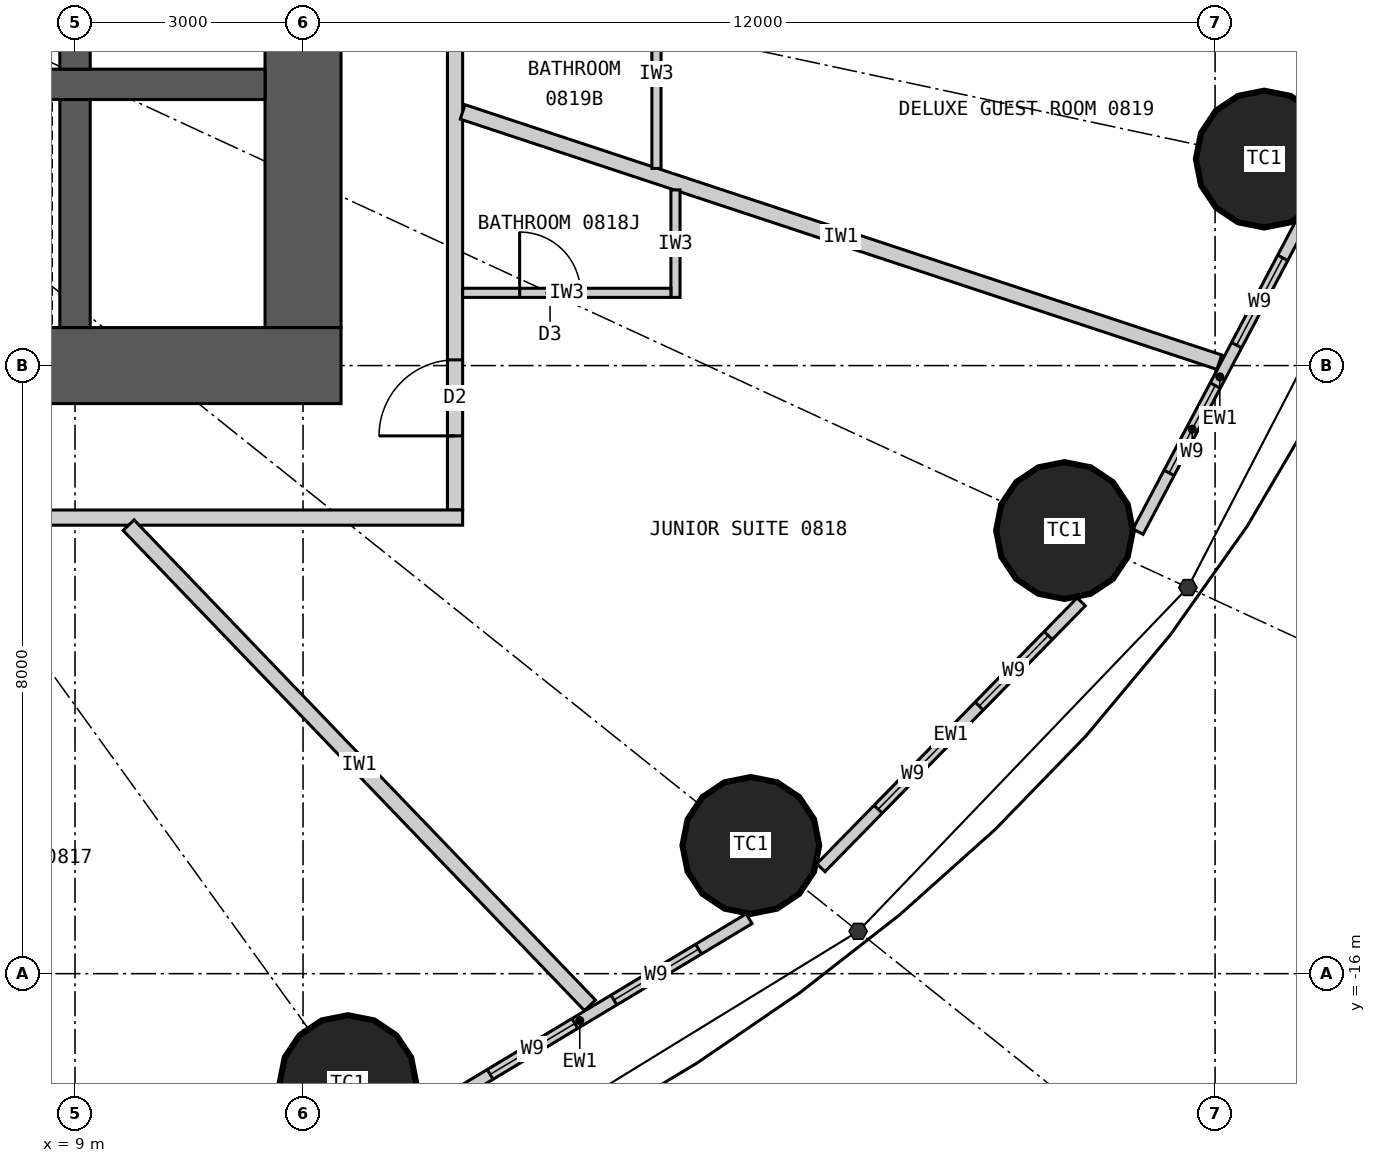
"""IFC4 building model, lengths in metres.
Left out: names, types, materials, properties, quantities, classifications, styles, units other than length and angle.
Written with IfcOpenShell. Run it as: python <this file> out.ifc"""

import sys

from ifc_helpers import new_model, si_unit, direction, frame, frame_2d, origin, origin_2d, place, context, subcontext, project, spatial, rectangle, circle, extrude, element, fill, save


model = new_model("IFC4")
c1 = context("Model", 3, precision=1e-05, world=origin(), true_north=direction((0.0, 1.0)))
c2 = subcontext(c1, "Body", "Model", "MODEL_VIEW")
j1 = project(units=[si_unit("LENGTHUNIT", "METRE"), si_unit("PLANEANGLEUNIT", "RADIAN")], contexts=[c1])
p1 = place(None, origin())
s1 = spatial("IfcSite", under=j1, at=p1, CompositionType="ELEMENT")
p2 = place(p1, origin())
s2 = spatial("IfcBuilding", under=s1, at=p2, CompositionType="ELEMENT")
p3 = place(p2, frame((0.0, 0.0, 39.3)))
s3 = spatial("IfcBuildingStorey", under=s2, at=p3, CompositionType="ELEMENT", Elevation=39.3)
for number, where, z_axis, x_axis in (
    (1, (12.591, -17.447, 0.0), (0.0, 0.0, 1.0), (1.0, 0.0, 0.0)),
    (2, (17.892, -14.313, 0.0), (0.0, 0.0, 1.0), (1.0, 0.0, 0.0)),
    (3, (22.019, -10.17, 0.0), (0.0, 0.0, 1.0), (1.0, 0.0, 0.0)),
    (4, (24.647, -5.283, 0.0), (0.0, 0.0, 1.0), (1.0, 0.0, 0.0)),
):
    element("IfcColumn", number, at=place(p3, frame(where, z_axis=z_axis, x_axis=x_axis)), inside=s3, PredefinedType="COLUMN", context=c2, shape_type="SweptSolid", body=[
        extrude(circle(Radius=0.9, at=origin_2d()), origin(), (0.0, 0.0, 1.0), 3.3),
    ])
p4 = place(p3, frame((12.5, -8.0, 0.0), z_axis=(0.0, 0.0, 1.0), x_axis=(-1.0, 0.0, 0.0)))
e5 = element("IfcWall", 5, at=p4, inside=s3, PredefinedType="SHEAR", context=c2, shape_type="SweptSolid", body=[
    extrude(rectangle(XDim=25.0, YDim=1.0, at=frame_2d((12.5, 0.0))), origin(), (0.0, 0.0, 1.0), 3.3),
])
p5 = place(p4, frame((11.2, 0.0, 0.0)))
e6 = element("IfcOpeningElement", 6, at=p5, cuts=e5, PredefinedType="OPENING", context=c2, shape_type="SweptSolid", body=[
    extrude(rectangle(XDim=1.2, YDim=2.2, at=frame_2d((0.6, 1.1))), frame((0.0, 0.51, 0.0), z_axis=(0.0, -1.0, 0.0), x_axis=(1.0, 0.0, 0.0)), (0.0, 0.0, 1.0), 1.02),
])
p6 = place(p4, frame((18.8, 0.0, 0.0)))
e7 = element("IfcOpeningElement", 7, at=p6, cuts=e5, PredefinedType="OPENING", context=c2, shape_type="SweptSolid", body=[
    extrude(rectangle(XDim=0.9, YDim=2.2, at=frame_2d((0.45, 1.1))), frame((0.0, 0.51, 0.0), z_axis=(0.0, -1.0, 0.0), x_axis=(1.0, 0.0, 0.0)), (0.0, 0.0, 1.0), 1.02),
])
p7 = place(p3, frame((12.0, -7.5, 0.0), z_axis=(0.0, 0.0, 1.0), x_axis=(0.0, 1.0, 0.0)))
e8 = element("IfcWall", 8, at=p7, inside=s3, PredefinedType="SHEAR", context=c2, shape_type="SweptSolid", body=[
    extrude(rectangle(XDim=15.0, YDim=1.0, at=frame_2d((7.5, 0.0))), origin(), (0.0, 0.0, 1.0), 3.3),
])
p8 = place(p7, frame((6.6, 0.0, 0.0)))
e9 = element("IfcOpeningElement", 9, at=p8, cuts=e8, PredefinedType="OPENING", context=c2, shape_type="SweptSolid", body=[
    extrude(rectangle(XDim=1.8, YDim=2.2, at=frame_2d((0.9, 1.1))), frame((0.0, 0.51, 0.0), z_axis=(0.0, -1.0, 0.0), x_axis=(1.0, 0.0, 0.0)), (0.0, 0.0, 1.0), 1.02),
])
p9 = place(p3, frame((-11.5, -4.3, 0.0), z_axis=(0.0, 0.0, 1.0), x_axis=(1.0, 0.0, 0.0)))
e10 = element("IfcWall", 10, at=p9, inside=s3, PredefinedType="SHEAR", context=c2, shape_type="SweptSolid", body=[
    extrude(rectangle(XDim=23.0, YDim=0.4, at=frame_2d((11.5, 0.0))), origin(), (0.0, 0.0, 1.0), 3.3),
])
p10 = place(p3, frame((9.0, -4.1, 0.0), z_axis=(0.0, 0.0, 1.0), x_axis=(0.0, 1.0, 0.0)))
e11 = element("IfcWall", 11, at=p10, inside=s3, PredefinedType="SHEAR", context=c2, shape_type="SweptSolid", body=[
    extrude(rectangle(XDim=2.35, YDim=0.4, at=frame_2d((1.175, 0.0))), origin(), (0.0, 0.0, 1.0), 3.3),
])
p11 = place(p3, frame((9.0, -7.5, 0.0), z_axis=(0.0, 0.0, 1.0), x_axis=(0.0, 1.0, 0.0)))
e12 = element("IfcWall", 12, at=p11, inside=s3, PredefinedType="SHEAR", context=c2, shape_type="SweptSolid", body=[
    extrude(rectangle(XDim=3.0, YDim=0.4, at=frame_2d((1.5, 0.0))), origin(), (0.0, 0.0, 1.0), 3.3),
])
p12 = place(p3, frame((13.412, -17.957, 0.0), z_axis=(0.0, 0.0, 1.0), x_axis=(0.856958191554, 0.515385931054, 0.0)))
e13 = element("IfcWall", 13, at=p12, inside=s3, PredefinedType="ELEMENTEDWALL", context=c2, shape_type="SweptSolid", body=[
    extrude(rectangle(XDim=5.201, YDim=0.15, at=frame_2d((2.601, 0.0))), origin(), (0.0, 0.0, 1.0), 3.12),
])
p13 = place(p12, frame((1.225, 0.0, 0.9)))
e14 = element("IfcOpeningElement", 14, at=p13, cuts=e13, PredefinedType="OPENING", context=c2, shape_type="SweptSolid", body=[
    extrude(rectangle(XDim=1.3, YDim=1.9, at=frame_2d((0.65, 0.95))), frame((0.0, 0.085, 0.0), z_axis=(0.0, -1.0, 0.0), x_axis=(1.0, 0.0, 0.0)), (0.0, 0.0, 1.0), 0.17),
])
p14 = place(p12, frame((3.125, 0.0, 0.9)))
e15 = element("IfcOpeningElement", 15, at=p14, cuts=e13, PredefinedType="OPENING", context=c2, shape_type="SweptSolid", body=[
    extrude(rectangle(XDim=1.3, YDim=1.9, at=frame_2d((0.65, 0.95))), frame((0.0, 0.085, 0.0), z_axis=(0.0, -1.0, 0.0), x_axis=(1.0, 0.0, 0.0)), (0.0, 0.0, 1.0), 0.17),
])
p15 = place(p3, frame((18.813, -14.607, 0.0), z_axis=(0.0, 0.0, 1.0), x_axis=(0.699612594083, 0.714522370679, 0.0)))
e16 = element("IfcWall", 16, at=p15, inside=s3, PredefinedType="ELEMENTEDWALL", context=c2, shape_type="SweptSolid", body=[
    extrude(rectangle(XDim=4.896, YDim=0.15, at=frame_2d((2.448, 0.0))), origin(), (0.0, 0.0, 1.0), 3.12),
])
p16 = place(p15, frame((1.077, 0.0, 0.9)))
e17 = element("IfcOpeningElement", 17, at=p16, cuts=e16, PredefinedType="OPENING", context=c2, shape_type="SweptSolid", body=[
    extrude(rectangle(XDim=1.3, YDim=1.9, at=frame_2d((0.65, 0.95))), frame((0.0, 0.085, 0.0), z_axis=(0.0, -1.0, 0.0), x_axis=(1.0, 0.0, 0.0)), (0.0, 0.0, 1.0), 0.17),
])
p17 = place(p15, frame((2.977, 0.0, 0.9)))
e18 = element("IfcOpeningElement", 18, at=p17, cuts=e16, PredefinedType="OPENING", context=c2, shape_type="SweptSolid", body=[
    extrude(rectangle(XDim=1.3, YDim=1.9, at=frame_2d((0.65, 0.95))), frame((0.0, 0.085, 0.0), z_axis=(0.0, -1.0, 0.0), x_axis=(1.0, 0.0, 0.0)), (0.0, 0.0, 1.0), 0.17),
])
p18 = place(p3, frame((22.986, -10.185, 0.0), z_axis=(0.0, 0.0, 1.0), x_axis=(0.467303182954, 0.884097129959, 0.0)))
e19 = element("IfcWall", 19, at=p18, inside=s3, PredefinedType="ELEMENTEDWALL", context=c2, shape_type="SweptSolid", body=[
    extrude(rectangle(XDim=4.606, YDim=0.15, at=frame_2d((2.303, 0.0))), origin(), (0.0, 0.0, 1.0), 3.12),
])
p19 = place(p18, frame((0.875, 0.0, 0.9)))
e20 = element("IfcOpeningElement", 20, at=p19, cuts=e19, PredefinedType="OPENING", context=c2, shape_type="SweptSolid", body=[
    extrude(rectangle(XDim=1.3, YDim=1.9, at=frame_2d((0.65, 0.95))), frame((0.0, 0.085, 0.0), z_axis=(0.0, -1.0, 0.0), x_axis=(1.0, 0.0, 0.0)), (0.0, 0.0, 1.0), 0.17),
])
p20 = place(p18, frame((2.775, 0.0, 0.9)))
e21 = element("IfcOpeningElement", 21, at=p20, cuts=e19, PredefinedType="OPENING", context=c2, shape_type="SweptSolid", body=[
    extrude(rectangle(XDim=1.3, YDim=1.9, at=frame_2d((0.65, 0.95))), frame((0.0, 0.085, 0.0), z_axis=(0.0, -1.0, 0.0), x_axis=(1.0, 0.0, 0.0)), (0.0, 0.0, 1.0), 0.17),
])
p21 = place(p3, frame((14.0, -9.9, 0.0), z_axis=(0.0, 0.0, 1.0), x_axis=(0.0, 1.0, 0.0)))
e22 = element("IfcWall", 22, at=p21, inside=s3, PredefinedType="PARTITIONING", context=c2, shape_type="SweptSolid", body=[
    extrude(rectangle(XDim=19.8, YDim=0.2, at=frame_2d((9.9, 0.0))), origin(), (0.0, 0.0, 1.0), 3.12),
])
p22 = place(p21, frame((11.698, 0.0, 0.0)))
e23 = element("IfcOpeningElement", 23, at=p22, cuts=e22, PredefinedType="OPENING", context=c2, shape_type="SweptSolid", body=[
    extrude(rectangle(XDim=1.0, YDim=2.2, at=frame_2d((0.5, 1.1))), frame((0.0, 0.11, 0.0), z_axis=(0.0, -1.0, 0.0), x_axis=(1.0, 0.0, 0.0)), (0.0, 0.0, 1.0), 0.22),
])
p23 = place(p21, frame((13.554, 0.0, 0.0)))
e24 = element("IfcOpeningElement", 24, at=p23, cuts=e22, PredefinedType="OPENING", context=c2, shape_type="SweptSolid", body=[
    extrude(rectangle(XDim=1.0, YDim=2.0, at=frame_2d((0.5, 1.0))), frame((0.0, 0.11, 0.0), z_axis=(0.0, -1.0, 0.0), x_axis=(1.0, 0.0, 0.0)), (0.0, 0.0, 1.0), 0.22),
])
p24 = place(p21, frame((18.698, 0.0, 0.0)))
e25 = element("IfcOpeningElement", 25, at=p24, cuts=e22, PredefinedType="OPENING", context=c2, shape_type="SweptSolid", body=[
    extrude(rectangle(XDim=1.0, YDim=2.2, at=frame_2d((0.5, 1.1))), frame((0.0, 0.11, 0.0), z_axis=(0.0, -1.0, 0.0), x_axis=(1.0, 0.0, 0.0)), (0.0, 0.0, 1.0), 0.22),
])
p25 = place(p21, frame((0.975, 0.0, 0.0)))
e26 = element("IfcOpeningElement", 26, at=p25, cuts=e22, PredefinedType="OPENING", context=c2, shape_type="SweptSolid", body=[
    extrude(rectangle(XDim=1.0, YDim=2.2, at=frame_2d((0.5, 1.1))), frame((0.0, 0.11, 0.0), z_axis=(0.0, -1.0, 0.0), x_axis=(1.0, 0.0, 0.0)), (0.0, 0.0, 1.0), 0.22),
])
p26 = place(p21, frame((7.097, 0.0, 0.0)))
e27 = element("IfcOpeningElement", 27, at=p26, cuts=e22, PredefinedType="OPENING", context=c2, shape_type="SweptSolid", body=[
    extrude(rectangle(XDim=1.0, YDim=2.2, at=frame_2d((0.5, 1.1))), frame((0.0, 0.11, 0.0), z_axis=(0.0, -1.0, 0.0), x_axis=(1.0, 0.0, 0.0)), (0.0, 0.0, 1.0), 0.22),
])
p27 = place(p3, frame((14.1, -10.0, 0.0), z_axis=(0.0, 0.0, 1.0), x_axis=(-1.0, 0.0, 0.0)))
e28 = element("IfcWall", 28, at=p27, inside=s3, PredefinedType="PARTITIONING", context=c2, shape_type="SweptSolid", body=[
    extrude(rectangle(XDim=28.2, YDim=0.2, at=frame_2d((14.1, 0.0))), origin(), (0.0, 0.0, 1.0), 3.12),
])
p28 = place(p27, frame((21.948, 0.0, 0.0)))
e29 = element("IfcOpeningElement", 29, at=p28, cuts=e28, PredefinedType="OPENING", context=c2, shape_type="SweptSolid", body=[
    extrude(rectangle(XDim=1.0, YDim=2.2, at=frame_2d((0.5, 1.1))), frame((0.0, 0.11, 0.0), z_axis=(0.0, -1.0, 0.0), x_axis=(1.0, 0.0, 0.0)), (0.0, 0.0, 1.0), 0.22),
])
p29 = place(p27, frame((15.684, 0.0, 0.0)))
e30 = element("IfcOpeningElement", 30, at=p29, cuts=e28, PredefinedType="OPENING", context=c2, shape_type="SweptSolid", body=[
    extrude(rectangle(XDim=1.0, YDim=2.2, at=frame_2d((0.5, 1.1))), frame((0.0, 0.11, 0.0), z_axis=(0.0, -1.0, 0.0), x_axis=(1.0, 0.0, 0.0)), (0.0, 0.0, 1.0), 0.22),
])
p30 = place(p27, frame((8.875, 0.0, 0.0)))
e31 = element("IfcOpeningElement", 31, at=p30, cuts=e28, PredefinedType="OPENING", context=c2, shape_type="SweptSolid", body=[
    extrude(rectangle(XDim=1.0, YDim=2.2, at=frame_2d((0.5, 1.1))), frame((0.0, 0.11, 0.0), z_axis=(0.0, -1.0, 0.0), x_axis=(1.0, 0.0, 0.0)), (0.0, 0.0, 1.0), 0.22),
])
p31 = place(p3, frame((9.705, -10.1, 0.0), z_axis=(0.0, 0.0, 1.0), x_axis=(0.692879226267, -0.721053658064, 0.0)))
e32 = element("IfcWall", 32, at=p31, inside=s3, PredefinedType="PARTITIONING", context=c2, shape_type="SweptSolid", body=[
    extrude(rectangle(XDim=8.761, YDim=0.2, at=frame_2d((4.38, 0.0))), origin(), (0.0, 0.0, 1.0), 3.12),
])
p32 = place(p3, frame((14.1, -4.663, 0.0), z_axis=(0.0, 0.0, 1.0), x_axis=(0.949432655039, -0.31397075269, 0.0)))
e33 = element("IfcWall", 33, at=p32, inside=s3, PredefinedType="PARTITIONING", context=c2, shape_type="SweptSolid", body=[
    extrude(rectangle(XDim=10.486, YDim=0.2, at=frame_2d((5.243, 0.0))), origin(), (0.0, 0.0, 1.0), 3.12),
])
p33 = place(p3, frame((16.9, -5.689, 0.0), z_axis=(0.0, 0.0, 1.0), x_axis=(0.0, -1.0, 0.0)))
e34 = element("IfcWall", 34, at=p33, inside=s3, PredefinedType="PARTITIONING", context=c2, shape_type="SweptSolid", body=[
    extrude(rectangle(XDim=1.414, YDim=0.12, at=frame_2d((0.707, 0.0))), origin(), (0.0, 0.0, 1.0), 3.12),
])
p34 = place(p3, frame((14.1, -7.043, 0.0), z_axis=(0.0, 0.0, 1.0), x_axis=(1.0, 0.0, 0.0)))
e35 = element("IfcWall", 35, at=p34, inside=s3, PredefinedType="PARTITIONING", context=c2, shape_type="SweptSolid", body=[
    extrude(rectangle(XDim=2.74, YDim=0.12, at=frame_2d((1.37, 0.0))), origin(), (0.0, 0.0, 1.0), 3.12),
])
p35 = place(p34, frame((0.75, 0.0, 0.0)))
e36 = element("IfcOpeningElement", 36, at=p35, cuts=e35, PredefinedType="OPENING", context=c2, shape_type="SweptSolid", body=[
    extrude(rectangle(XDim=0.8, YDim=2.1, at=frame_2d((0.4, 1.05))), frame((0.0, 0.07, 0.0), z_axis=(0.0, -1.0, 0.0), x_axis=(1.0, 0.0, 0.0)), (0.0, 0.0, 1.0), 0.14),
])
p36 = place(p3, frame((16.65, -5.406, 0.0), z_axis=(0.0, 0.0, 1.0), x_axis=(0.0, 1.0, 0.0)))
e37 = element("IfcWall", 37, at=p36, inside=s3, PredefinedType="PARTITIONING", context=c2, shape_type="SweptSolid", body=[
    extrude(rectangle(XDim=2.483, YDim=0.12, at=frame_2d((1.242, 0.0))), origin(), (0.0, 0.0, 1.0), 3.12),
])
p37 = place(p13, origin())
e38 = element("IfcWindow", 38, at=p37, inside=s3, PartitioningType="SINGLE_PANEL", PredefinedType="WINDOW", context=c2, shape_type="SweptSolid", body=[
    extrude(rectangle(XDim=1.3, YDim=1.9, at=frame_2d((0.65, 0.95))), frame((0.0, 0.03, 0.0), z_axis=(0.0, -1.0, 0.0), x_axis=(1.0, 0.0, 0.0)), (0.0, 0.0, 1.0), 0.06),
])
fill(e14, e38)
p38 = place(p14, origin())
e39 = element("IfcWindow", 39, at=p38, inside=s3, PartitioningType="SINGLE_PANEL", PredefinedType="WINDOW", context=c2, shape_type="SweptSolid", body=[
    extrude(rectangle(XDim=1.3, YDim=1.9, at=frame_2d((0.65, 0.95))), frame((0.0, 0.03, 0.0), z_axis=(0.0, -1.0, 0.0), x_axis=(1.0, 0.0, 0.0)), (0.0, 0.0, 1.0), 0.06),
])
fill(e15, e39)
p39 = place(p16, origin())
e40 = element("IfcWindow", 40, at=p39, inside=s3, PartitioningType="SINGLE_PANEL", PredefinedType="WINDOW", context=c2, shape_type="SweptSolid", body=[
    extrude(rectangle(XDim=1.3, YDim=1.9, at=frame_2d((0.65, 0.95))), frame((0.0, 0.03, 0.0), z_axis=(0.0, -1.0, 0.0), x_axis=(1.0, 0.0, 0.0)), (0.0, 0.0, 1.0), 0.06),
])
fill(e17, e40)
p40 = place(p17, origin())
e41 = element("IfcWindow", 41, at=p40, inside=s3, PartitioningType="SINGLE_PANEL", PredefinedType="WINDOW", context=c2, shape_type="SweptSolid", body=[
    extrude(rectangle(XDim=1.3, YDim=1.9, at=frame_2d((0.65, 0.95))), frame((0.0, 0.03, 0.0), z_axis=(0.0, -1.0, 0.0), x_axis=(1.0, 0.0, 0.0)), (0.0, 0.0, 1.0), 0.06),
])
fill(e18, e41)
p41 = place(p19, origin())
e42 = element("IfcWindow", 42, at=p41, inside=s3, PartitioningType="SINGLE_PANEL", PredefinedType="WINDOW", context=c2, shape_type="SweptSolid", body=[
    extrude(rectangle(XDim=1.3, YDim=1.9, at=frame_2d((0.65, 0.95))), frame((0.0, 0.03, 0.0), z_axis=(0.0, -1.0, 0.0), x_axis=(1.0, 0.0, 0.0)), (0.0, 0.0, 1.0), 0.06),
])
fill(e20, e42)
p42 = place(p20, origin())
e43 = element("IfcWindow", 43, at=p42, inside=s3, PartitioningType="SINGLE_PANEL", PredefinedType="WINDOW", context=c2, shape_type="SweptSolid", body=[
    extrude(rectangle(XDim=1.3, YDim=1.9, at=frame_2d((0.65, 0.95))), frame((0.0, 0.03, 0.0), z_axis=(0.0, -1.0, 0.0), x_axis=(1.0, 0.0, 0.0)), (0.0, 0.0, 1.0), 0.06),
])
fill(e21, e43)
p43 = place(p35, origin())
e44 = element("IfcDoor", 44, at=p43, inside=s3, OperationType="SINGLE_SWING_LEFT", PredefinedType="DOOR", context=c2, shape_type="SweptSolid", body=[
    extrude(rectangle(XDim=0.8, YDim=2.1, at=frame_2d((0.4, 1.05))), frame((0.0, 0.025, 0.0), z_axis=(0.0, -1.0, 0.0), x_axis=(1.0, 0.0, 0.0)), (0.0, 0.0, 1.0), 0.05),
])
fill(e36, e44)
p44 = place(p25, origin())
e45 = element("IfcDoor", 45, at=p44, inside=s3, OperationType="SINGLE_SWING_LEFT", PredefinedType="DOOR", context=c2, shape_type="SweptSolid", body=[
    extrude(rectangle(XDim=1.0, YDim=2.2, at=frame_2d((0.5, 1.1))), frame((0.0, 0.025, 0.0), z_axis=(0.0, -1.0, 0.0), x_axis=(1.0, 0.0, 0.0)), (0.0, 0.0, 1.0), 0.05),
])
fill(e26, e45)
save(model, sys.argv[1])
